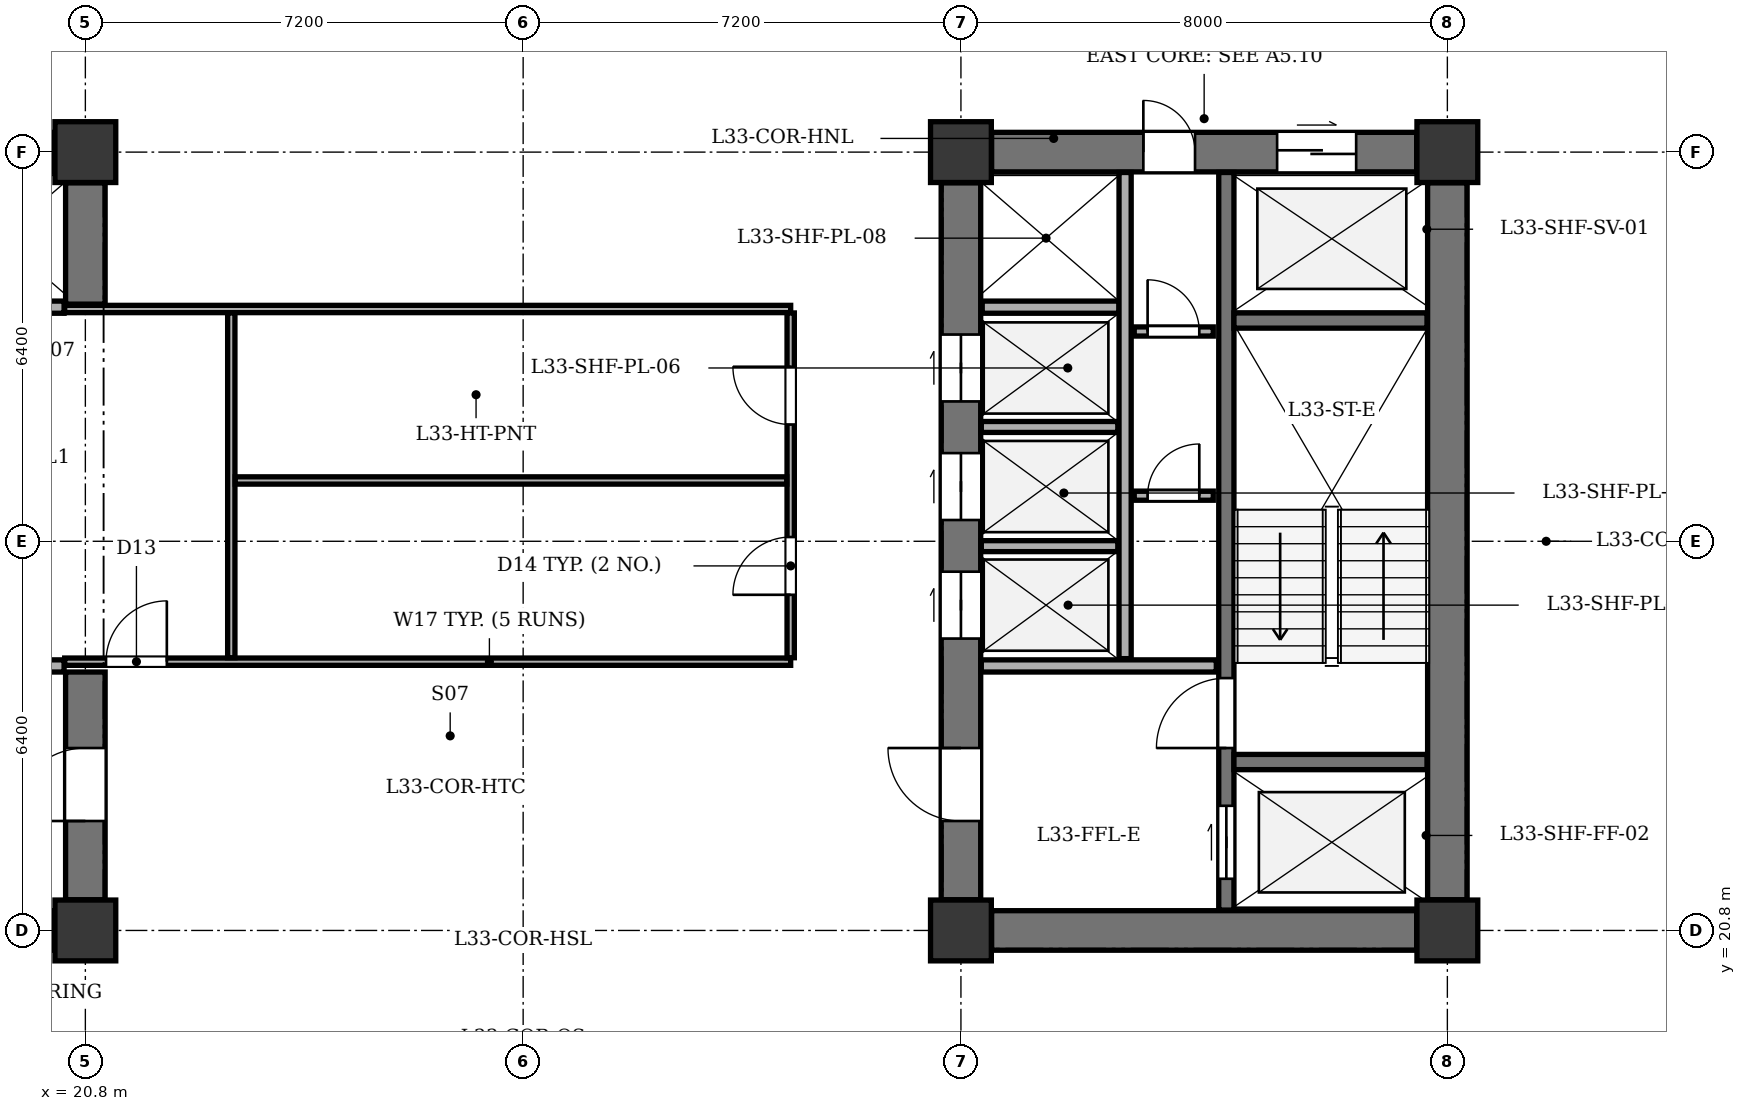
"""IFC4 building model, lengths in metres.
Left out: names, types, materials, properties, quantities, classifications, styles, units other than length and angle.
Written with IfcOpenShell. Run it as: python <this file> out.ifc"""

import sys

from ifc_helpers import new_model, si_unit, direction, frame, frame_2d, origin, origin_2d, place, context, subcontext, project, spatial, rectangle, extrude, element, fill, save


model = new_model("IFC4")
c1 = context("Model", 3, precision=1e-05, world=origin(), true_north=direction((0.0, 1.0)))
c2 = subcontext(c1, "Body", "Model", "MODEL_VIEW")
j1 = project(units=[si_unit("LENGTHUNIT", "METRE"), si_unit("PLANEANGLEUNIT", "RADIAN")], contexts=[c1])
p1 = place(None, origin())
s1 = spatial("IfcSite", under=j1, at=p1, CompositionType="ELEMENT")
p2 = place(p1, origin())
s2 = spatial("IfcBuilding", under=s1, at=p2, CompositionType="ELEMENT")
p3 = place(p2, frame((0.0, 0.0, 134.3)))
s3 = spatial("IfcBuildingStorey", under=s2, at=p3, CompositionType="ELEMENT", Elevation=134.3)
for number, where, z_axis, x_axis in (
    (1, (20.8, 20.8, 0.0), (0.0, 0.0, 1.0), (1.0, 0.0, 0.0)),
    (2, (20.8, 33.6, 0.0), (0.0, 0.0, 1.0), (1.0, 0.0, 0.0)),
    (3, (35.2, 20.8, 0.0), (0.0, 0.0, 1.0), (1.0, 0.0, 0.0)),
    (4, (43.2, 20.8, 0.0), (0.0, 0.0, 1.0), (1.0, 0.0, 0.0)),
    (5, (35.2, 33.6, 0.0), (0.0, 0.0, 1.0), (1.0, 0.0, 0.0)),
    (6, (43.2, 33.6, 0.0), (0.0, 0.0, 1.0), (1.0, 0.0, 0.0)),
):
    element("IfcColumn", number, at=place(p3, frame(where, z_axis=z_axis, x_axis=x_axis)), inside=s3, PredefinedType="COLUMN", context=c2, shape_type="SweptSolid", body=[
        extrude(rectangle(XDim=1.0, YDim=1.0, at=origin_2d()), origin(), (0.0, 0.0, 1.0), 3.5),
    ])
p4 = place(p3, frame((13.305, 20.8, 0.0), z_axis=(0.0, 0.0, 1.0), x_axis=(1.0, 0.0, 0.0)))
e7 = element("IfcWall", 7, at=p4, inside=s3, PredefinedType="SHEAR", context=c2, shape_type="SweptSolid", body=[
    extrude(rectangle(XDim=6.99, YDim=0.65, at=frame_2d((3.495, 0.0))), origin(), (0.0, 0.0, 1.0), 3.2),
])
p5 = place(p3, frame((13.305, 33.6, 0.0), z_axis=(0.0, 0.0, 1.0), x_axis=(1.0, 0.0, 0.0)))
e8 = element("IfcWall", 8, at=p5, inside=s3, PredefinedType="SHEAR", context=c2, shape_type="SweptSolid", body=[
    extrude(rectangle(XDim=6.99, YDim=0.65, at=frame_2d((3.495, 0.0))), origin(), (0.0, 0.0, 1.0), 3.2),
])
p6 = place(p5, frame((0.395, 0.0, 0.0)))
e9 = element("IfcOpeningElement", 9, at=p6, cuts=e8, PredefinedType="OPENING", context=c2, shape_type="SweptSolid", body=[
    extrude(rectangle(XDim=0.85, YDim=2.02, at=frame_2d((0.425, 1.01))), frame((0.0, 0.335, 0.0), z_axis=(0.0, -1.0, 0.0), x_axis=(1.0, 0.0, 0.0)), (0.0, 0.0, 1.0), 0.67),
])
p7 = place(p5, frame((1.695, 0.0, 0.0)))
e10 = element("IfcOpeningElement", 10, at=p7, cuts=e8, PredefinedType="OPENING", context=c2, shape_type="SweptSolid", body=[
    extrude(rectangle(XDim=0.85, YDim=2.02, at=frame_2d((0.425, 1.01))), frame((0.0, 0.335, 0.0), z_axis=(0.0, -1.0, 0.0), x_axis=(1.0, 0.0, 0.0)), (0.0, 0.0, 1.0), 0.67),
])
p8 = place(p3, frame((20.8, 21.305, 0.0), z_axis=(0.0, 0.0, 1.0), x_axis=(0.0, 1.0, 0.0)))
e11 = element("IfcWall", 11, at=p8, inside=s3, PredefinedType="SHEAR", context=c2, shape_type="SweptSolid", body=[
    extrude(rectangle(XDim=3.745, YDim=0.65, at=frame_2d((1.873, 0.0))), origin(), (0.0, 0.0, 1.0), 3.2),
])
p9 = place(p8, frame((1.295, 0.0, 0.0)))
e12 = element("IfcOpeningElement", 12, at=p9, cuts=e11, PredefinedType="OPENING", context=c2, shape_type="SweptSolid", body=[
    extrude(rectangle(XDim=1.2, YDim=2.15, at=frame_2d((0.6, 1.075))), frame((0.0, 0.335, 0.0), z_axis=(0.0, -1.0, 0.0), x_axis=(1.0, 0.0, 0.0)), (0.0, 0.0, 1.0), 0.67),
])
p10 = place(p3, frame((20.8, 31.1, 0.0), z_axis=(0.0, 0.0, 1.0), x_axis=(0.0, 1.0, 0.0)))
e13 = element("IfcWall", 13, at=p10, inside=s3, PredefinedType="SHEAR", context=c2, shape_type="SweptSolid", body=[
    extrude(rectangle(XDim=1.995, YDim=0.65, at=frame_2d((0.998, 0.0))), origin(), (0.0, 0.0, 1.0), 3.2),
])
for number, where, z_axis, x_axis in (
    (14, (16.6, 25.15, 0.0), (0.0, 0.0, 1.0), (1.0, 0.0, 0.0)),
    (15, (16.6, 31.05, 0.0), (0.0, 0.0, 1.0), (1.0, 0.0, 0.0)),
):
    element("IfcWall", number, at=place(p3, frame(where, z_axis=z_axis, x_axis=x_axis)), inside=s3, PredefinedType="SOLIDWALL", context=c2, shape_type="SweptSolid", body=[
        extrude(rectangle(XDim=3.85, YDim=0.2, at=frame_2d((1.925, 0.0))), origin(), (0.0, 0.0, 1.0), 3.2),
    ])
p11 = place(p3, frame((43.2, 21.305, 0.0), z_axis=(0.0, 0.0, 1.0), x_axis=(0.0, 1.0, 0.0)))
e16 = element("IfcWall", 16, at=p11, inside=s3, PredefinedType="SHEAR", context=c2, shape_type="SweptSolid", body=[
    extrude(rectangle(XDim=11.79, YDim=0.65, at=frame_2d((5.895, 0.0))), origin(), (0.0, 0.0, 1.0), 3.2),
])
p12 = place(p3, frame((35.705, 20.8, 0.0), z_axis=(0.0, 0.0, 1.0), x_axis=(1.0, 0.0, 0.0)))
e17 = element("IfcWall", 17, at=p12, inside=s3, PredefinedType="SHEAR", context=c2, shape_type="SweptSolid", body=[
    extrude(rectangle(XDim=6.99, YDim=0.65, at=frame_2d((3.495, 0.0))), origin(), (0.0, 0.0, 1.0), 3.2),
])
p13 = place(p3, frame((35.705, 33.6, 0.0), z_axis=(0.0, 0.0, 1.0), x_axis=(1.0, 0.0, 0.0)))
e18 = element("IfcWall", 18, at=p13, inside=s3, PredefinedType="SHEAR", context=c2, shape_type="SweptSolid", body=[
    extrude(rectangle(XDim=6.99, YDim=0.65, at=frame_2d((3.495, 0.0))), origin(), (0.0, 0.0, 1.0), 3.2),
])
p14 = place(p13, frame((4.695, 0.0, 0.0)))
e19 = element("IfcOpeningElement", 19, at=p14, cuts=e18, PredefinedType="OPENING", context=c2, shape_type="SweptSolid", body=[
    extrude(rectangle(XDim=1.3, YDim=2.15, at=frame_2d((0.65, 1.075))), frame((0.0, 0.335, 0.0), z_axis=(0.0, -1.0, 0.0), x_axis=(1.0, 0.0, 0.0)), (0.0, 0.0, 1.0), 0.67),
])
p15 = place(p13, frame((2.495, 0.0, 0.0)))
e20 = element("IfcOpeningElement", 20, at=p15, cuts=e18, PredefinedType="OPENING", context=c2, shape_type="SweptSolid", body=[
    extrude(rectangle(XDim=0.85, YDim=2.02, at=frame_2d((0.425, 1.01))), frame((0.0, 0.335, 0.0), z_axis=(0.0, -1.0, 0.0), x_axis=(1.0, 0.0, 0.0)), (0.0, 0.0, 1.0), 0.67),
])
p16 = place(p3, frame((35.2, 21.305, 0.0), z_axis=(0.0, 0.0, 1.0), x_axis=(0.0, 1.0, 0.0)))
e21 = element("IfcWall", 21, at=p16, inside=s3, PredefinedType="SHEAR", context=c2, shape_type="SweptSolid", body=[
    extrude(rectangle(XDim=11.79, YDim=0.65, at=frame_2d((5.895, 0.0))), origin(), (0.0, 0.0, 1.0), 3.2),
])
p17 = place(p16, frame((1.295, 0.0, 0.0)))
e22 = element("IfcOpeningElement", 22, at=p17, cuts=e21, PredefinedType="OPENING", context=c2, shape_type="SweptSolid", body=[
    extrude(rectangle(XDim=1.2, YDim=2.15, at=frame_2d((0.6, 1.075))), frame((0.0, 0.335, 0.0), z_axis=(0.0, -1.0, 0.0), x_axis=(1.0, 0.0, 0.0)), (0.0, 0.0, 1.0), 0.67),
])
p18 = place(p16, frame((4.295, 0.0, 0.0)))
e23 = element("IfcOpeningElement", 23, at=p18, cuts=e21, PredefinedType="OPENING", context=c2, shape_type="SweptSolid", body=[
    extrude(rectangle(XDim=1.1, YDim=2.1, at=frame_2d((0.55, 1.05))), frame((0.0, 0.335, 0.0), z_axis=(0.0, -1.0, 0.0), x_axis=(1.0, 0.0, 0.0)), (0.0, 0.0, 1.0), 0.67),
])
p19 = place(p16, frame((6.245, 0.0, 0.0)))
e24 = element("IfcOpeningElement", 24, at=p19, cuts=e21, PredefinedType="OPENING", context=c2, shape_type="SweptSolid", body=[
    extrude(rectangle(XDim=1.1, YDim=2.1, at=frame_2d((0.55, 1.05))), frame((0.0, 0.335, 0.0), z_axis=(0.0, -1.0, 0.0), x_axis=(1.0, 0.0, 0.0)), (0.0, 0.0, 1.0), 0.67),
])
p20 = place(p16, frame((8.195, 0.0, 0.0)))
e25 = element("IfcOpeningElement", 25, at=p20, cuts=e21, PredefinedType="OPENING", context=c2, shape_type="SweptSolid", body=[
    extrude(rectangle(XDim=1.1, YDim=2.1, at=frame_2d((0.55, 1.05))), frame((0.0, 0.335, 0.0), z_axis=(0.0, -1.0, 0.0), x_axis=(1.0, 0.0, 0.0)), (0.0, 0.0, 1.0), 0.67),
])
p21 = place(p3, frame((39.565, 21.135, 0.0), z_axis=(0.0, 0.0, 1.0), x_axis=(0.0, 1.0, 0.0)))
e26 = element("IfcWall", 26, at=p21, inside=s3, PredefinedType="SHEAR", context=c2, shape_type="SweptSolid", body=[
    extrude(rectangle(XDim=12.13, YDim=0.25, at=frame_2d((6.065, 0.0))), origin(), (0.0, 0.0, 1.0), 3.2),
])
p22 = place(p21, frame((0.515, 0.0, 0.0)))
e27 = element("IfcOpeningElement", 27, at=p22, cuts=e26, PredefinedType="OPENING", context=c2, shape_type="SweptSolid", body=[
    extrude(rectangle(XDim=1.2, YDim=2.15, at=frame_2d((0.6, 1.075))), frame((0.0, 0.135, 0.0), z_axis=(0.0, -1.0, 0.0), x_axis=(1.0, 0.0, 0.0)), (0.0, 0.0, 1.0), 0.27),
])
p23 = place(p21, frame((2.665, 0.0, 0.0)))
e28 = element("IfcOpeningElement", 28, at=p23, cuts=e26, PredefinedType="OPENING", context=c2, shape_type="SweptSolid", body=[
    extrude(rectangle(XDim=1.15, YDim=2.15, at=frame_2d((0.575, 1.075))), frame((0.0, 0.135, 0.0), z_axis=(0.0, -1.0, 0.0), x_axis=(1.0, 0.0, 0.0)), (0.0, 0.0, 1.0), 0.27),
])
for number, where, z_axis, x_axis in (
    (29, (39.69, 23.57, 0.0), (0.0, 0.0, 1.0), (1.0, 0.0, 0.0)),
    (30, (39.69, 30.83, 0.0), (0.0, 0.0, 1.0), (1.0, 0.0, 0.0)),
):
    element("IfcWall", number, at=place(p3, frame(where, z_axis=z_axis, x_axis=x_axis)), inside=s3, PredefinedType="SHEAR", context=c2, shape_type="SweptSolid", body=[
        extrude(rectangle(XDim=3.175, YDim=0.25, at=frame_2d((1.587, 0.0))), origin(), (0.0, 0.0, 1.0), 3.2),
    ])
p24 = place(p3, frame((35.535, 25.15, 0.0), z_axis=(0.0, 0.0, 1.0), x_axis=(1.0, 0.0, 0.0)))
e31 = element("IfcWall", 31, at=p24, inside=s3, PredefinedType="SOLIDWALL", context=c2, shape_type="SweptSolid", body=[
    extrude(rectangle(XDim=3.865, YDim=0.2, at=frame_2d((1.933, 0.0))), origin(), (0.0, 0.0, 1.0), 3.2),
])
p25 = place(p3, frame((35.55, 31.05, 0.0), z_axis=(0.0, 0.0, 1.0), x_axis=(1.0, 0.0, 0.0)))
e32 = element("IfcWall", 32, at=p25, inside=s3, PredefinedType="SOLIDWALL", context=c2, shape_type="SweptSolid", body=[
    extrude(rectangle(XDim=2.25, YDim=0.2, at=frame_2d((1.125, 0.0))), origin(), (0.0, 0.0, 1.0), 3.2),
])
p26 = place(p3, frame((37.9, 25.27, 0.0), z_axis=(0.0, 0.0, 1.0), x_axis=(0.0, 1.0, 0.0)))
e33 = element("IfcWall", 33, at=p26, inside=s3, PredefinedType="SOLIDWALL", context=c2, shape_type="SweptSolid", body=[
    extrude(rectangle(XDim=7.995, YDim=0.2, at=frame_2d((3.998, 0.0))), origin(), (0.0, 0.0, 1.0), 3.2),
])
for number, where, z_axis, x_axis in (
    (34, (35.535, 27.12, 0.0), (0.0, 0.0, 1.0), (1.0, 0.0, 0.0)),
    (35, (35.535, 29.08, 0.0), (0.0, 0.0, 1.0), (1.0, 0.0, 0.0)),
):
    element("IfcWall", number, at=place(p3, frame(where, z_axis=z_axis, x_axis=x_axis)), inside=s3, PredefinedType="PARTITIONING", context=c2, shape_type="SweptSolid", body=[
        extrude(rectangle(XDim=2.245, YDim=0.18, at=frame_2d((1.123, 0.0))), origin(), (0.0, 0.0, 1.0), 3.2),
    ])
p27 = place(p3, frame((38.05, 27.95, 0.0), z_axis=(0.0, 0.0, 1.0), x_axis=(1.0, 0.0, 0.0)))
e36 = element("IfcWall", 36, at=p27, inside=s3, PredefinedType="PARTITIONING", context=c2, shape_type="SweptSolid", body=[
    extrude(rectangle(XDim=1.3, YDim=0.15, at=frame_2d((0.65, 0.0))), origin(), (0.0, 0.0, 1.0), 3.2),
])
p28 = place(p27, frame((0.22, 0.0, 0.0)))
e37 = element("IfcOpeningElement", 37, at=p28, cuts=e36, PredefinedType="OPENING", context=c2, shape_type="SweptSolid", body=[
    extrude(rectangle(XDim=0.85, YDim=2.02, at=frame_2d((0.425, 1.01))), frame((0.0, 0.085, 0.0), z_axis=(0.0, -1.0, 0.0), x_axis=(1.0, 0.0, 0.0)), (0.0, 0.0, 1.0), 0.17),
])
p29 = place(p3, frame((38.05, 30.65, 0.0), z_axis=(0.0, 0.0, 1.0), x_axis=(1.0, 0.0, 0.0)))
e38 = element("IfcWall", 38, at=p29, inside=s3, PredefinedType="PARTITIONING", context=c2, shape_type="SweptSolid", body=[
    extrude(rectangle(XDim=1.3, YDim=0.15, at=frame_2d((0.65, 0.0))), origin(), (0.0, 0.0, 1.0), 3.2),
])
p30 = place(p29, frame((0.22, 0.0, 0.0)))
e39 = element("IfcOpeningElement", 39, at=p30, cuts=e38, PredefinedType="OPENING", context=c2, shape_type="SweptSolid", body=[
    extrude(rectangle(XDim=0.85, YDim=2.02, at=frame_2d((0.425, 1.01))), frame((0.0, 0.085, 0.0), z_axis=(0.0, -1.0, 0.0), x_axis=(1.0, 0.0, 0.0)), (0.0, 0.0, 1.0), 0.17),
])
p31 = place(p3, frame((20.46, 25.22, 0.0), z_axis=(0.0, 0.0, 1.0), x_axis=(1.0, 0.0, 0.0)))
e40 = element("IfcWall", 40, at=p31, inside=s3, PredefinedType="PARTITIONING", context=c2, shape_type="SweptSolid", body=[
    extrude(rectangle(XDim=11.94, YDim=0.12, at=frame_2d((5.97, 0.0))), origin(), (0.0, 0.0, 1.0), 3.2),
])
p32 = place(p31, frame((0.68, 0.0, 0.0)))
e41 = element("IfcOpeningElement", 41, at=p32, cuts=e40, PredefinedType="OPENING", context=c2, shape_type="SweptSolid", body=[
    extrude(rectangle(XDim=1.0, YDim=2.1, at=frame_2d((0.5, 1.05))), frame((0.0, 0.07, 0.0), z_axis=(0.0, -1.0, 0.0), x_axis=(1.0, 0.0, 0.0)), (0.0, 0.0, 1.0), 0.14),
])
p33 = place(p3, frame((20.46, 31.02, 0.0), z_axis=(0.0, 0.0, 1.0), x_axis=(1.0, 0.0, 0.0)))
e42 = element("IfcWall", 42, at=p33, inside=s3, PredefinedType="PARTITIONING", context=c2, shape_type="SweptSolid", body=[
    extrude(rectangle(XDim=11.94, YDim=0.12, at=frame_2d((5.97, 0.0))), origin(), (0.0, 0.0, 1.0), 3.2),
])
p34 = place(p3, frame((32.4, 25.285, 0.0), z_axis=(0.0, 0.0, 1.0), x_axis=(0.0, 1.0, 0.0)))
e43 = element("IfcWall", 43, at=p34, inside=s3, PredefinedType="PARTITIONING", context=c2, shape_type="SweptSolid", body=[
    extrude(rectangle(XDim=5.67, YDim=0.12, at=frame_2d((2.835, 0.0))), origin(), (0.0, 0.0, 1.0), 3.2),
])
p35 = place(p34, frame((1.035, 0.0, 0.0)))
e44 = element("IfcOpeningElement", 44, at=p35, cuts=e43, PredefinedType="OPENING", context=c2, shape_type="SweptSolid", body=[
    extrude(rectangle(XDim=0.95, YDim=2.1, at=frame_2d((0.475, 1.05))), frame((0.0, 0.07, 0.0), z_axis=(0.0, -1.0, 0.0), x_axis=(1.0, 0.0, 0.0)), (0.0, 0.0, 1.0), 0.14),
])
p36 = place(p34, frame((3.835, 0.0, 0.0)))
e45 = element("IfcOpeningElement", 45, at=p36, cuts=e43, PredefinedType="OPENING", context=c2, shape_type="SweptSolid", body=[
    extrude(rectangle(XDim=0.95, YDim=2.1, at=frame_2d((0.475, 1.05))), frame((0.0, 0.07, 0.0), z_axis=(0.0, -1.0, 0.0), x_axis=(1.0, 0.0, 0.0)), (0.0, 0.0, 1.0), 0.14),
])
p37 = place(p3, frame((23.2, 25.285, 0.0), z_axis=(0.0, 0.0, 1.0), x_axis=(0.0, 1.0, 0.0)))
e46 = element("IfcWall", 46, at=p37, inside=s3, PredefinedType="PARTITIONING", context=c2, shape_type="SweptSolid", body=[
    extrude(rectangle(XDim=5.67, YDim=0.12, at=frame_2d((2.835, 0.0))), origin(), (0.0, 0.0, 1.0), 3.2),
])
p38 = place(p3, frame((23.265, 28.2, 0.0), z_axis=(0.0, 0.0, 1.0), x_axis=(1.0, 0.0, 0.0)))
e47 = element("IfcWall", 47, at=p38, inside=s3, PredefinedType="PARTITIONING", context=c2, shape_type="SweptSolid", body=[
    extrude(rectangle(XDim=9.07, YDim=0.12, at=frame_2d((4.535, 0.0))), origin(), (0.0, 0.0, 1.0), 3.2),
])
p39 = place(p9, origin())
e48 = element("IfcDoor", 48, at=p39, inside=s3, OperationType="SINGLE_SWING_LEFT", PredefinedType="DOOR", context=c2, shape_type="SweptSolid", body=[
    extrude(rectangle(XDim=1.2, YDim=2.15, at=frame_2d((0.6, 1.075))), frame((0.0, 0.025, 0.0), z_axis=(0.0, -1.0, 0.0), x_axis=(1.0, 0.0, 0.0)), (0.0, 0.0, 1.0), 0.05),
])
fill(e12, e48)
p40 = place(p14, origin())
e49 = element("IfcDoor", 49, at=p40, inside=s3, OperationType="DOUBLE_DOOR_SLIDING", PredefinedType="DOOR", context=c2, shape_type="SweptSolid", body=[
    extrude(rectangle(XDim=1.3, YDim=2.15, at=frame_2d((0.65, 1.075))), frame((0.0, 0.025, 0.0), z_axis=(0.0, -1.0, 0.0), x_axis=(1.0, 0.0, 0.0)), (0.0, 0.0, 1.0), 0.05),
])
fill(e19, e49)
p41 = place(p15, origin())
e50 = element("IfcDoor", 50, at=p41, inside=s3, OperationType="SINGLE_SWING_LEFT", PredefinedType="DOOR", context=c2, shape_type="SweptSolid", body=[
    extrude(rectangle(XDim=0.85, YDim=2.02, at=frame_2d((0.425, 1.01))), frame((0.0, 0.025, 0.0), z_axis=(0.0, -1.0, 0.0), x_axis=(1.0, 0.0, 0.0)), (0.0, 0.0, 1.0), 0.05),
])
fill(e20, e50)
p42 = place(p17, origin())
e51 = element("IfcDoor", 51, at=p42, inside=s3, OperationType="SINGLE_SWING_RIGHT", PredefinedType="DOOR", context=c2, shape_type="SweptSolid", body=[
    extrude(rectangle(XDim=1.2, YDim=2.15, at=frame_2d((0.6, 1.075))), frame((0.0, 0.025, 0.0), z_axis=(0.0, -1.0, 0.0), x_axis=(1.0, 0.0, 0.0)), (0.0, 0.0, 1.0), 0.05),
])
fill(e22, e51)
p43 = place(p18, origin())
e52 = element("IfcDoor", 52, at=p43, inside=s3, OperationType="DOUBLE_DOOR_SLIDING", PredefinedType="DOOR", context=c2, shape_type="SweptSolid", body=[
    extrude(rectangle(XDim=1.1, YDim=2.1, at=frame_2d((0.55, 1.05))), frame((0.0, 0.025, 0.0), z_axis=(0.0, -1.0, 0.0), x_axis=(1.0, 0.0, 0.0)), (0.0, 0.0, 1.0), 0.05),
])
fill(e23, e52)
p44 = place(p19, origin())
e53 = element("IfcDoor", 53, at=p44, inside=s3, OperationType="DOUBLE_DOOR_SLIDING", PredefinedType="DOOR", context=c2, shape_type="SweptSolid", body=[
    extrude(rectangle(XDim=1.1, YDim=2.1, at=frame_2d((0.55, 1.05))), frame((0.0, 0.025, 0.0), z_axis=(0.0, -1.0, 0.0), x_axis=(1.0, 0.0, 0.0)), (0.0, 0.0, 1.0), 0.05),
])
fill(e24, e53)
p45 = place(p20, origin())
e54 = element("IfcDoor", 54, at=p45, inside=s3, OperationType="DOUBLE_DOOR_SLIDING", PredefinedType="DOOR", context=c2, shape_type="SweptSolid", body=[
    extrude(rectangle(XDim=1.1, YDim=2.1, at=frame_2d((0.55, 1.05))), frame((0.0, 0.025, 0.0), z_axis=(0.0, -1.0, 0.0), x_axis=(1.0, 0.0, 0.0)), (0.0, 0.0, 1.0), 0.05),
])
fill(e25, e54)
p46 = place(p22, origin())
e55 = element("IfcDoor", 55, at=p46, inside=s3, OperationType="DOUBLE_DOOR_SLIDING", PredefinedType="DOOR", context=c2, shape_type="SweptSolid", body=[
    extrude(rectangle(XDim=1.2, YDim=2.15, at=frame_2d((0.6, 1.075))), frame((0.0, 0.025, 0.0), z_axis=(0.0, -1.0, 0.0), x_axis=(1.0, 0.0, 0.0)), (0.0, 0.0, 1.0), 0.05),
])
fill(e27, e55)
p47 = place(p23, origin())
e56 = element("IfcDoor", 56, at=p47, inside=s3, OperationType="SINGLE_SWING_LEFT", PredefinedType="DOOR", context=c2, shape_type="SweptSolid", body=[
    extrude(rectangle(XDim=1.15, YDim=2.15, at=frame_2d((0.575, 1.075))), frame((0.0, 0.025, 0.0), z_axis=(0.0, -1.0, 0.0), x_axis=(1.0, 0.0, 0.0)), (0.0, 0.0, 1.0), 0.05),
])
fill(e28, e56)
p48 = place(p28, origin())
e57 = element("IfcDoor", 57, at=p48, inside=s3, OperationType="SINGLE_SWING_RIGHT", PredefinedType="DOOR", context=c2, shape_type="SweptSolid", body=[
    extrude(rectangle(XDim=0.85, YDim=2.02, at=frame_2d((0.425, 1.01))), frame((0.0, 0.025, 0.0), z_axis=(0.0, -1.0, 0.0), x_axis=(1.0, 0.0, 0.0)), (0.0, 0.0, 1.0), 0.05),
])
fill(e37, e57)
p49 = place(p30, origin())
e58 = element("IfcDoor", 58, at=p49, inside=s3, OperationType="SINGLE_SWING_LEFT", PredefinedType="DOOR", context=c2, shape_type="SweptSolid", body=[
    extrude(rectangle(XDim=0.85, YDim=2.02, at=frame_2d((0.425, 1.01))), frame((0.0, 0.025, 0.0), z_axis=(0.0, -1.0, 0.0), x_axis=(1.0, 0.0, 0.0)), (0.0, 0.0, 1.0), 0.05),
])
fill(e39, e58)
p50 = place(p32, origin())
e59 = element("IfcDoor", 59, at=p50, inside=s3, OperationType="SINGLE_SWING_RIGHT", PredefinedType="DOOR", context=c2, shape_type="SweptSolid", body=[
    extrude(rectangle(XDim=1.0, YDim=2.1, at=frame_2d((0.5, 1.05))), frame((0.0, 0.025, 0.0), z_axis=(0.0, -1.0, 0.0), x_axis=(1.0, 0.0, 0.0)), (0.0, 0.0, 1.0), 0.05),
])
fill(e41, e59)
p51 = place(p35, origin())
e60 = element("IfcDoor", 60, at=p51, inside=s3, OperationType="SINGLE_SWING_LEFT", PredefinedType="DOOR", context=c2, shape_type="SweptSolid", body=[
    extrude(rectangle(XDim=0.95, YDim=2.1, at=frame_2d((0.475, 1.05))), frame((0.0, 0.025, 0.0), z_axis=(0.0, -1.0, 0.0), x_axis=(1.0, 0.0, 0.0)), (0.0, 0.0, 1.0), 0.05),
])
fill(e44, e60)
p52 = place(p36, origin())
e61 = element("IfcDoor", 61, at=p52, inside=s3, OperationType="SINGLE_SWING_RIGHT", PredefinedType="DOOR", context=c2, shape_type="SweptSolid", body=[
    extrude(rectangle(XDim=0.95, YDim=2.1, at=frame_2d((0.475, 1.05))), frame((0.0, 0.025, 0.0), z_axis=(0.0, -1.0, 0.0), x_axis=(1.0, 0.0, 0.0)), (0.0, 0.0, 1.0), 0.05),
])
fill(e45, e61)
save(model, sys.argv[1])
